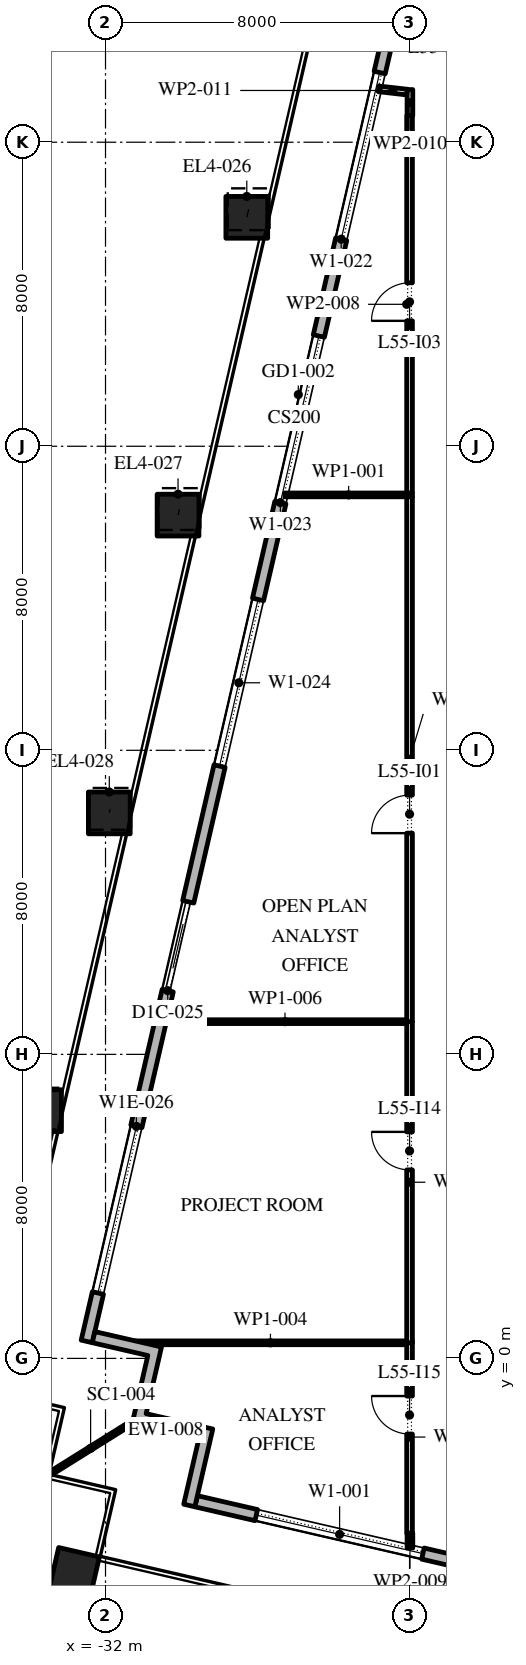
"""IFC4 building model, lengths in metres.
Left out: names, types, materials, properties, quantities, classifications, styles, units other than length and angle.
Written with IfcOpenShell. Run it as: python <this file> out.ifc"""

import sys

from ifc_helpers import new_model, si_unit, direction, frame, frame_2d, origin, origin_2d, place, context, subcontext, project, spatial, polyline, rectangle, outline, extrude, element, fill, save


model = new_model("IFC4")
c1 = context("Model", 3, precision=1e-05, world=origin(), true_north=direction((0.0, 1.0)))
c2 = subcontext(c1, "Body", "Model", "MODEL_VIEW")
j1 = project(units=[si_unit("LENGTHUNIT", "METRE"), si_unit("PLANEANGLEUNIT", "RADIAN")], contexts=[c1])
p1 = place(None, origin())
s1 = spatial("IfcSite", under=j1, at=p1, CompositionType="ELEMENT")
p2 = place(p1, origin())
s2 = spatial("IfcBuilding", under=s1, at=p2, CompositionType="ELEMENT")
p3 = place(p2, frame((0.0, 0.0, 255.6)))
s3 = spatial("IfcBuildingStorey", under=s2, at=p3, CompositionType="ELEMENT", Elevation=255.6)
p4 = place(p3, frame((-32.821, -5.635, 0.0), z_axis=(0.0, 0.0, 1.0), x_axis=(0.974370064785, -0.224951054344, 0.0)))
e1 = element("IfcColumn", 1, at=p4, inside=s3, PredefinedType="COLUMN", context=c2, shape_type="SweptSolid", body=[
    extrude(rectangle(XDim=1.1, YDim=1.1, at=origin_2d()), origin(), (0.0, 0.0, 1.0), 4.2),
])
p5 = place(p3, frame((-28.283, 30.024, 0.0), z_axis=(0.01172631027, 0.050562456661, 0.998652057337), x_axis=(-0.974145569572, 0.225921245756, 0.0)))
e2 = element("IfcColumn", 2, at=p5, inside=s3, PredefinedType="COLUMN", context=c2, shape_type="SweptSolid", body=[
    extrude(rectangle(XDim=1.1, YDim=1.1, at=origin_2d()), origin(), (0.0, 0.0, 1.0), 4.206),
])
p6 = place(p3, frame((-30.092, 22.188, 0.0), z_axis=(0.008770865357, 0.037987721479, 0.999239713451), x_axis=(-0.97436607968, 0.224968315033, 0.0)))
e3 = element("IfcColumn", 3, at=p6, inside=s3, PredefinedType="COLUMN", context=c2, shape_type="SweptSolid", body=[
    extrude(rectangle(XDim=1.1, YDim=1.1, at=origin_2d()), origin(), (0.0, 0.0, 1.0), 4.203),
])
p7 = place(p3, frame((-31.9, 14.353, 0.0), z_axis=(0.005810975449, 0.025335852957, 0.999662106474), x_axis=(-0.974691740237, 0.22355315143, 0.0)))
e4 = element("IfcColumn", 4, at=p7, inside=s3, PredefinedType="COLUMN", context=c2, shape_type="SweptSolid", body=[
    extrude(rectangle(XDim=1.1, YDim=1.1, at=origin_2d()), origin(), (0.0, 0.0, 1.0), 4.201),
])
p8 = place(p3, frame((-33.709, 6.517, 0.0), z_axis=(0.002906224189, 0.012671137464, 0.999915494498), x_axis=(-0.974691740237, 0.22355315143, 0.0)))
e5 = element("IfcColumn", 5, at=p8, inside=s3, PredefinedType="COLUMN", context=c2, shape_type="SweptSolid", body=[
    extrude(rectangle(XDim=1.1, YDim=1.1, at=origin_2d()), origin(), (0.0, 0.0, 1.0), 4.2),
])
p9 = place(p3, frame((-29.616, -3.758, 0.0), z_axis=(0.0, 0.0, 1.0), x_axis=(0.974370532314, -0.224949029246, 0.0)))
e6 = element("IfcWall", 6, at=p9, inside=s3, PredefinedType="STANDARD", context=c2, shape_type="SweptSolid", body=[
    extrude(rectangle(XDim=48.0, YDim=0.3, at=frame_2d((24.0, 0.0))), origin(), (0.0, 0.0, 1.0), 4.0),
])
p10 = place(p9, frame((1.625, 0.0, 0.45)))
e7 = element("IfcOpeningElement", 7, at=p10, cuts=e6, PredefinedType="OPENING", context=c2, shape_type="SweptSolid", body=[
    extrude(rectangle(XDim=4.5, YDim=3.05, at=frame_2d((2.25, 1.525))), frame((0.0, 0.16, 0.0), z_axis=(0.0, -1.0, 0.0), x_axis=(1.0, 0.0, 0.0)), (0.0, 0.0, 1.0), 0.32),
])
p11 = place(p9, frame((10.575, 0.0, 0.0)))
e8 = element("IfcOpeningElement", 8, at=p11, cuts=e6, PredefinedType="OPENING", context=c2, shape_type="SweptSolid", body=[
    extrude(rectangle(XDim=2.4, YDim=3.5, at=frame_2d((1.2, 1.75))), frame((0.0, 0.16, 0.0), z_axis=(0.0, -1.0, 0.0), x_axis=(1.0, 0.0, 0.0)), (0.0, 0.0, 1.0), 0.32),
])
p12 = place(p9, frame((17.575, 0.0, 0.45)))
e9 = element("IfcOpeningElement", 9, at=p12, cuts=e6, PredefinedType="OPENING", context=c2, shape_type="SweptSolid", body=[
    extrude(rectangle(XDim=4.5, YDim=3.0, at=frame_2d((2.25, 1.5))), frame((0.0, 0.16, 0.0), z_axis=(0.0, -1.0, 0.0), x_axis=(1.0, 0.0, 0.0)), (0.0, 0.0, 1.0), 0.32),
])
p13 = place(p9, frame((25.625, 0.0, 0.45)))
e10 = element("IfcOpeningElement", 10, at=p13, cuts=e6, PredefinedType="OPENING", context=c2, shape_type="SweptSolid", body=[
    extrude(rectangle(XDim=4.5, YDim=3.05, at=frame_2d((2.25, 1.525))), frame((0.0, 0.16, 0.0), z_axis=(0.0, -1.0, 0.0), x_axis=(1.0, 0.0, 0.0)), (0.0, 0.0, 1.0), 0.32),
])
p14 = place(p9, frame((33.675, 0.0, 0.45)))
e11 = element("IfcOpeningElement", 11, at=p14, cuts=e6, PredefinedType="OPENING", context=c2, shape_type="SweptSolid", body=[
    extrude(rectangle(XDim=4.5, YDim=2.825, at=frame_2d((2.25, 1.413))), frame((0.0, 0.16, 0.0), z_axis=(0.0, -1.0, 0.0), x_axis=(1.0, 0.0, 0.0)), (0.0, 0.0, 1.0), 0.32),
])
p15 = place(p9, frame((42.775, 0.0, 0.0)))
e12 = element("IfcOpeningElement", 12, at=p15, cuts=e6, PredefinedType="OPENING", context=c2, shape_type="SweptSolid", body=[
    extrude(rectangle(XDim=2.4, YDim=3.5, at=frame_2d((1.2, 1.75))), frame((0.0, 0.16, 0.0), z_axis=(0.0, -1.0, 0.0), x_axis=(1.0, 0.0, 0.0)), (0.0, 0.0, 1.0), 0.32),
])
p16 = place(p3, frame((-21.359, 48.678, 0.0), z_axis=(0.0, 0.0, 1.0), x_axis=(-0.224949198343, -0.974370493275, 0.0)))
e13 = element("IfcWall", 13, at=p16, inside=s3, PredefinedType="STANDARD", context=c2, shape_type="SweptSolid", body=[
    extrude(rectangle(XDim=49.5, YDim=0.3, at=frame_2d((24.75, 0.0))), origin(), (0.0, 0.0, 1.0), 4.0),
])
p17 = place(p16, frame((1.157, 0.0, 0.45)))
e14 = element("IfcOpeningElement", 14, at=p17, cuts=e13, PredefinedType="OPENING", context=c2, shape_type="SweptSolid", body=[
    extrude(rectangle(XDim=4.5, YDim=3.05, at=frame_2d((2.25, 1.525))), frame((0.0, 0.16, 0.0), z_axis=(0.0, -1.0, 0.0), x_axis=(1.0, 0.0, 0.0)), (0.0, 0.0, 1.0), 0.32),
])
p18 = place(p16, frame((9.171, 0.0, 0.0)))
e15 = element("IfcOpeningElement", 15, at=p18, cuts=e13, PredefinedType="OPENING", context=c2, shape_type="SweptSolid", body=[
    extrude(rectangle(XDim=2.4, YDim=3.5, at=frame_2d((1.2, 1.75))), frame((0.0, 0.16, 0.0), z_axis=(0.0, -1.0, 0.0), x_axis=(1.0, 0.0, 0.0)), (0.0, 0.0, 1.0), 0.32),
])
p19 = place(p16, frame((15.236, 0.0, 0.45)))
e16 = element("IfcOpeningElement", 16, at=p19, cuts=e13, PredefinedType="OPENING", context=c2, shape_type="SweptSolid", body=[
    extrude(rectangle(XDim=4.5, YDim=3.05, at=frame_2d((2.25, 1.525))), frame((0.0, 0.16, 0.0), z_axis=(0.0, -1.0, 0.0), x_axis=(1.0, 0.0, 0.0)), (0.0, 0.0, 1.0), 0.32),
])
p20 = place(p16, frame((22.35, 0.0, 0.45)))
e17 = element("IfcOpeningElement", 17, at=p20, cuts=e13, PredefinedType="OPENING", context=c2, shape_type="SweptSolid", body=[
    extrude(rectangle(XDim=4.5, YDim=3.05, at=frame_2d((2.25, 1.525))), frame((0.0, 0.16, 0.0), z_axis=(0.0, -1.0, 0.0), x_axis=(1.0, 0.0, 0.0)), (0.0, 0.0, 1.0), 0.32),
])
p21 = place(p16, frame((29.464, 0.0, 0.45)))
e18 = element("IfcOpeningElement", 18, at=p21, cuts=e13, PredefinedType="OPENING", context=c2, shape_type="SweptSolid", body=[
    extrude(rectangle(XDim=4.5, YDim=3.05, at=frame_2d((2.25, 1.525))), frame((0.0, 0.16, 0.0), z_axis=(0.0, -1.0, 0.0), x_axis=(1.0, 0.0, 0.0)), (0.0, 0.0, 1.0), 0.32),
])
p22 = place(p16, frame((37.628, 0.0, 0.0)))
e19 = element("IfcOpeningElement", 19, at=p22, cuts=e13, PredefinedType="OPENING", context=c2, shape_type="SweptSolid", body=[
    extrude(rectangle(XDim=2.4, YDim=3.325, at=frame_2d((1.2, 1.663))), frame((0.0, 0.16, 0.0), z_axis=(0.0, -1.0, 0.0), x_axis=(1.0, 0.0, 0.0)), (0.0, 0.0, 1.0), 0.32),
])
p23 = place(p16, frame((43.693, 0.0, 0.45)))
e20 = element("IfcOpeningElement", 20, at=p23, cuts=e13, PredefinedType="OPENING", context=c2, shape_type="SweptSolid", body=[
    extrude(rectangle(XDim=4.5, YDim=2.825, at=frame_2d((2.25, 1.413))), frame((0.0, 0.16, 0.0), z_axis=(0.0, -1.0, 0.0), x_axis=(1.0, 0.0, 0.0)), (0.0, 0.0, 1.0), 0.32),
])
p24 = place(p3, origin())
e21 = element("IfcWall", 21, at=p24, inside=s3, PredefinedType="STANDARD", context=c2, shape_type="SweptSolid", body=[
    extrude(outline(polyline([(-31.291, -1.678), (-30.886, 0.076), (-32.348, 0.413), (-32.28, 0.705), (-30.526, 0.301), (-30.931, -1.453), (-29.177, -1.858), (-29.65, -3.905), (-29.942, -3.837), (-29.537, -2.083), (-31.291, -1.678)])), origin(), (0.0, 0.0, 1.0), 4.0),
])
p25 = place(p3, frame((-31.291, -1.678, -0.05), z_axis=(0.0, 0.0, 1.0), x_axis=(-0.84807753525, -0.529872148923, 0.0)))
e22 = element("IfcWall", 22, at=p25, inside=s3, PredefinedType="STANDARD", context=c2, shape_type="SweptSolid", body=[
    extrude(rectangle(XDim=2.596, YDim=0.1, at=frame_2d((1.298, 0.0))), origin(), (0.0, 0.0, 1.0), 4.05),
])
p26 = place(p3, frame((-27.28, 22.72, 0.0), z_axis=(0.0, 0.0, 1.0), x_axis=(1.0, 0.0, 0.0)))
e23 = element("IfcWall", 23, at=p26, inside=s3, PredefinedType="PARTITIONING", context=c2, shape_type="SweptSolid", body=[
    extrude(rectangle(XDim=3.355, YDim=0.1, at=frame_2d((1.677, 0.0))), origin(), (0.0, 0.0, 1.0), 4.0),
])
p27 = place(p3, frame((-24.0, -4.6, 0.0), z_axis=(0.0, 0.0, 1.0), x_axis=(0.0, 1.0, 0.0)))
e24 = element("IfcWall", 24, at=p27, inside=s3, PredefinedType="PARTITIONING", context=c2, shape_type="SweptSolid", body=[
    extrude(rectangle(XDim=5.06, YDim=0.15, at=frame_2d((2.53, 0.0))), origin(), (0.0, 0.0, 1.0), 4.0),
])
p28 = place(p27, frame((2.61, 0.0, 0.0)))
e25 = element("IfcOpeningElement", 25, at=p28, cuts=e24, PredefinedType="OPENING", context=c2, shape_type="SweptSolid", body=[
    extrude(rectangle(XDim=1.0, YDim=2.1, at=frame_2d((0.5, 1.05))), frame((0.0, 0.085, 0.0), z_axis=(0.0, -1.0, 0.0), x_axis=(1.0, 0.0, 0.0)), (0.0, 0.0, 1.0), 0.17),
])
p29 = place(p3, frame((-24.075, 0.41, 0.0), z_axis=(0.0, 0.0, 1.0), x_axis=(-1.0, 0.0, 0.0)))
e26 = element("IfcWall", 26, at=p29, inside=s3, PredefinedType="PARTITIONING", context=c2, shape_type="SweptSolid", body=[
    extrude(rectangle(XDim=7.17, YDim=0.1, at=frame_2d((3.585, 0.0))), origin(), (0.0, 0.0, 1.0), 4.0),
])
p30 = place(p3, frame((-24.0, 0.41, 0.0), z_axis=(0.0, 0.0, 1.0), x_axis=(0.0, 1.0, 0.0)))
e27 = element("IfcWall", 27, at=p30, inside=s3, PredefinedType="PARTITIONING", context=c2, shape_type="SweptSolid", body=[
    extrude(rectangle(XDim=8.45, YDim=0.15, at=frame_2d((4.225, 0.0))), origin(), (0.0, 0.0, 1.0), 4.0),
])
p31 = place(p30, frame((4.55, 0.0, 0.0)))
e28 = element("IfcOpeningElement", 28, at=p31, cuts=e27, PredefinedType="OPENING", context=c2, shape_type="SweptSolid", body=[
    extrude(rectangle(XDim=1.0, YDim=2.1, at=frame_2d((0.5, 1.05))), frame((0.0, 0.085, 0.0), z_axis=(0.0, -1.0, 0.0), x_axis=(1.0, 0.0, 0.0)), (0.0, 0.0, 1.0), 0.17),
])
p32 = place(p3, frame((-24.075, 8.86, 0.0), z_axis=(0.0, 0.0, 1.0), x_axis=(-1.0, 0.0, 0.0)))
e29 = element("IfcWall", 29, at=p32, inside=s3, PredefinedType="PARTITIONING", context=c2, shape_type="SweptSolid", body=[
    extrude(rectangle(XDim=6.405, YDim=0.1, at=frame_2d((3.203, 0.0))), origin(), (0.0, 0.0, 1.0), 4.0),
])
p33 = place(p3, frame((-24.0, 8.86, 0.0), z_axis=(0.0, 0.0, 1.0), x_axis=(0.0, 1.0, 0.0)))
e30 = element("IfcWall", 30, at=p33, inside=s3, PredefinedType="PARTITIONING", context=c2, shape_type="SweptSolid", body=[
    extrude(rectangle(XDim=13.81, YDim=0.15, at=frame_2d((6.905, 0.0))), origin(), (0.0, 0.0, 1.0), 4.0),
])
p34 = place(p33, frame((4.96, 0.0, 0.0)))
e31 = element("IfcOpeningElement", 31, at=p34, cuts=e30, PredefinedType="OPENING", context=c2, shape_type="SweptSolid", body=[
    extrude(rectangle(XDim=1.0, YDim=2.1, at=frame_2d((0.5, 1.05))), frame((0.0, 0.085, 0.0), z_axis=(0.0, -1.0, 0.0), x_axis=(1.0, 0.0, 0.0)), (0.0, 0.0, 1.0), 0.17),
])
p35 = place(p3, frame((-24.0, 22.77, 0.0), z_axis=(0.0, 0.0, 1.0), x_axis=(0.0, 1.0, 0.0)))
e32 = element("IfcWall", 32, at=p35, inside=s3, PredefinedType="PARTITIONING", context=c2, shape_type="SweptSolid", body=[
    extrude(rectangle(XDim=9.93, YDim=0.15, at=frame_2d((4.965, 0.0))), origin(), (0.0, 0.0, 1.0), 4.0),
])
p36 = place(p35, frame((4.53, 0.0, 0.0)))
e33 = element("IfcOpeningElement", 33, at=p36, cuts=e32, PredefinedType="OPENING", context=c2, shape_type="SweptSolid", body=[
    extrude(rectangle(XDim=1.0, YDim=2.1, at=frame_2d((0.5, 1.05))), frame((0.0, 0.085, 0.0), z_axis=(0.0, -1.0, 0.0), x_axis=(1.0, 0.0, 0.0)), (0.0, 0.0, 1.0), 0.17),
])
p37 = place(p3, frame((-23.99, -4.986, 0.0), z_axis=(0.0, 0.0, 1.0), x_axis=(0.0, 1.0, 0.0)))
e34 = element("IfcWall", 34, at=p37, inside=s3, PredefinedType="PARTITIONING", context=c2, shape_type="SweptSolid", body=[
    extrude(rectangle(XDim=0.386, YDim=0.15, at=frame_2d((0.193, 0.0))), origin(), (0.0, 0.0, 1.0), 4.0),
])
p38 = place(p3, frame((-23.99, 32.7, 0.0), z_axis=(0.0, 0.0, 1.0), x_axis=(0.0, 1.0, 0.0)))
e35 = element("IfcWall", 35, at=p38, inside=s3, PredefinedType="PARTITIONING", context=c2, shape_type="SweptSolid", body=[
    extrude(rectangle(XDim=0.685, YDim=0.15, at=frame_2d((0.343, 0.0))), origin(), (0.0, 0.0, 1.0), 4.0),
])
p39 = place(p3, frame((-24.065, 33.319, 0.0), z_axis=(0.0, 0.0, 1.0), x_axis=(-0.993611867789, 0.112851478456, 0.0)))
e36 = element("IfcWall", 36, at=p39, inside=s3, PredefinedType="PARTITIONING", context=c2, shape_type="SweptSolid", body=[
    extrude(rectangle(XDim=0.753, YDim=0.15, at=frame_2d((0.376, 0.0))), origin(), (0.0, 0.0, 1.0), 4.0),
])
p40 = place(p10, origin())
e37 = element("IfcWindow", 37, at=p40, inside=s3, PartitioningType="DOUBLE_PANEL_VERTICAL", PredefinedType="WINDOW", context=c2, shape_type="SweptSolid", body=[
    extrude(rectangle(XDim=4.5, YDim=3.05, at=frame_2d((2.25, 1.525))), frame((0.0, 0.03, 0.0), z_axis=(0.0, -1.0, 0.0), x_axis=(1.0, 0.0, 0.0)), (0.0, 0.0, 1.0), 0.06),
])
fill(e7, e37)
p41 = place(p19, origin())
e38 = element("IfcWindow", 38, at=p41, inside=s3, PartitioningType="DOUBLE_PANEL_VERTICAL", PredefinedType="WINDOW", context=c2, shape_type="SweptSolid", body=[
    extrude(rectangle(XDim=4.5, YDim=3.05, at=frame_2d((2.25, 1.525))), frame((0.0, 0.03, 0.0), z_axis=(0.0, -1.0, 0.0), x_axis=(1.0, 0.0, 0.0)), (0.0, 0.0, 1.0), 0.06),
])
fill(e16, e38)
p42 = place(p20, origin())
e39 = element("IfcWindow", 39, at=p42, inside=s3, PartitioningType="DOUBLE_PANEL_VERTICAL", PredefinedType="WINDOW", context=c2, shape_type="SweptSolid", body=[
    extrude(rectangle(XDim=4.5, YDim=3.05, at=frame_2d((2.25, 1.525))), frame((0.0, 0.03, 0.0), z_axis=(0.0, -1.0, 0.0), x_axis=(1.0, 0.0, 0.0)), (0.0, 0.0, 1.0), 0.06),
])
fill(e17, e39)
p43 = place(p21, origin())
e40 = element("IfcWindow", 40, at=p43, inside=s3, PartitioningType="DOUBLE_PANEL_VERTICAL", PredefinedType="WINDOW", context=c2, shape_type="SweptSolid", body=[
    extrude(rectangle(XDim=4.5, YDim=3.05, at=frame_2d((2.25, 1.525))), frame((0.0, 0.03, 0.0), z_axis=(0.0, -1.0, 0.0), x_axis=(1.0, 0.0, 0.0)), (0.0, 0.0, 1.0), 0.06),
])
fill(e18, e40)
p44 = place(p22, origin())
e41 = element("IfcDoor", 41, at=p44, inside=s3, OperationType="DOUBLE_DOOR_SLIDING", PredefinedType="DOOR", context=c2, shape_type="SweptSolid", body=[
    extrude(rectangle(XDim=2.4, YDim=3.325, at=frame_2d((1.2, 1.663))), frame((0.0, 0.025, 0.0), z_axis=(0.0, -1.0, 0.0), x_axis=(1.0, 0.0, 0.0)), (0.0, 0.0, 1.0), 0.05),
])
fill(e19, e41)
p45 = place(p23, origin())
e42 = element("IfcWindow", 42, at=p45, inside=s3, PartitioningType="DOUBLE_PANEL_VERTICAL", PredefinedType="WINDOW", context=c2, shape_type="SweptSolid", body=[
    extrude(rectangle(XDim=4.5, YDim=2.825, at=frame_2d((2.25, 1.413))), frame((0.0, 0.03, 0.0), z_axis=(0.0, -1.0, 0.0), x_axis=(1.0, 0.0, 0.0)), (0.0, 0.0, 1.0), 0.06),
])
fill(e20, e42)
p46 = place(p34, origin())
e43 = element("IfcDoor", 43, at=p46, inside=s3, OperationType="SINGLE_SWING_RIGHT", PredefinedType="DOOR", context=c2, shape_type="SweptSolid", body=[
    extrude(rectangle(XDim=1.0, YDim=2.1, at=frame_2d((0.5, 1.05))), frame((0.0, 0.025, 0.0), z_axis=(0.0, -1.0, 0.0), x_axis=(1.0, 0.0, 0.0)), (0.0, 0.0, 1.0), 0.05),
])
fill(e31, e43)
p47 = place(p36, origin())
e44 = element("IfcDoor", 44, at=p47, inside=s3, OperationType="SINGLE_SWING_RIGHT", PredefinedType="DOOR", context=c2, shape_type="SweptSolid", body=[
    extrude(rectangle(XDim=1.0, YDim=2.1, at=frame_2d((0.5, 1.05))), frame((0.0, 0.025, 0.0), z_axis=(0.0, -1.0, 0.0), x_axis=(1.0, 0.0, 0.0)), (0.0, 0.0, 1.0), 0.05),
])
fill(e33, e44)
p48 = place(p31, origin())
e45 = element("IfcDoor", 45, at=p48, inside=s3, OperationType="SINGLE_SWING_LEFT", PredefinedType="DOOR", context=c2, shape_type="SweptSolid", body=[
    extrude(rectangle(XDim=1.0, YDim=2.1, at=frame_2d((0.5, 1.05))), frame((0.0, 0.025, 0.0), z_axis=(0.0, -1.0, 0.0), x_axis=(1.0, 0.0, 0.0)), (0.0, 0.0, 1.0), 0.05),
])
fill(e28, e45)
p49 = place(p28, origin())
e46 = element("IfcDoor", 46, at=p49, inside=s3, OperationType="SINGLE_SWING_LEFT", PredefinedType="DOOR", context=c2, shape_type="SweptSolid", body=[
    extrude(rectangle(XDim=1.0, YDim=2.1, at=frame_2d((0.5, 1.05))), frame((0.0, 0.025, 0.0), z_axis=(0.0, -1.0, 0.0), x_axis=(1.0, 0.0, 0.0)), (0.0, 0.0, 1.0), 0.05),
])
fill(e25, e46)
save(model, sys.argv[1])
